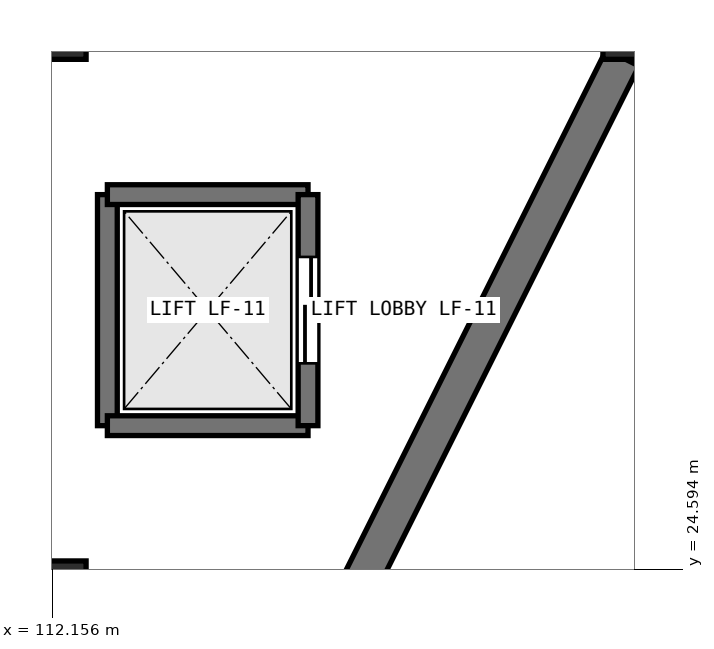
"""IFC4 building model, lengths in metres.
Left out: names, types, materials, properties, quantities, classifications, styles, units other than length and angle.
Written with IfcOpenShell. Run it as: python <this file> out.ifc"""

import sys

from ifc_helpers import new_model, si_unit, direction, frame, frame_2d, origin, origin_2d, place, context, subcontext, project, spatial, rectangle, extrude, element, fill, save


model = new_model("IFC4")
c1 = context("Model", 3, precision=1e-05, world=origin(), true_north=direction((0.0, 1.0)))
c2 = subcontext(c1, "Body", "Model", "MODEL_VIEW")
j1 = project(units=[si_unit("LENGTHUNIT", "METRE"), si_unit("PLANEANGLEUNIT", "RADIAN")], contexts=[c1])
p1 = place(None, origin())
s1 = spatial("IfcSite", under=j1, at=p1, CompositionType="ELEMENT")
p2 = place(p1, origin())
s2 = spatial("IfcBuilding", under=s1, at=p2, CompositionType="ELEMENT")
p3 = place(p2, frame((0.0, 0.0, -4.8)))
s3 = spatial("IfcBuildingStorey", under=s2, at=p3, CompositionType="ELEMENT", Elevation=-4.8)
for number, where, z_axis, x_axis in (
    (1, (112.0, 24.0, 0.0), (0.0, 0.0, 1.0), (1.0, 0.0, 0.0)),
    (2, (112.0, 32.0, 0.0), (0.0, 0.0, 1.0), (1.0, 0.0, 0.0)),
    (3, (120.0, 32.0, 0.0), (0.0, 0.0, 1.0), (1.0, 0.0, 0.0)),
):
    element("IfcColumn", number, at=place(p3, frame(where, z_axis=z_axis, x_axis=x_axis)), inside=s3, PredefinedType="COLUMN", context=c2, shape_type="SweptSolid", body=[
        extrude(rectangle(XDim=1.2, YDim=1.4, at=origin_2d()), origin(), (0.0, 0.0, 1.0), 4.8),
    ])
p4 = place(p3, frame((119.66, 31.32, 0.0), z_axis=(0.0, 0.0, 1.0), x_axis=(-0.447201662923, -0.894433157189, 0.0)))
e4 = element("IfcWall", 4, at=p4, inside=s3, PredefinedType="USERDEFINED", context=c2, shape_type="SweptSolid", body=[
    extrude(rectangle(XDim=8.184, YDim=0.48, at=frame_2d((4.092, 0.0))), origin(), (0.0, 0.0, 1.0), 4.46),
])
p5 = place(p3, frame((112.88, 26.48, 0.0), z_axis=(0.0, 0.0, 1.0), x_axis=(0.0, 1.0, 0.0)))
e5 = element("IfcWall", 5, at=p5, inside=s3, PredefinedType="SHEAR", context=c2, shape_type="SweptSolid", body=[
    extrude(rectangle(XDim=3.04, YDim=0.26, at=frame_2d((1.52, 0.0))), origin(), (0.0, 0.0, 1.0), 4.46),
])
for number, where, z_axis, x_axis in (
    (6, (112.88, 29.52, 0.0), (0.0, 0.0, 1.0), (1.0, 0.0, 0.0)),
    (7, (115.52, 26.48, 0.0), (0.0, 0.0, 1.0), (-1.0, 0.0, 0.0)),
):
    element("IfcWall", number, at=place(p3, frame(where, z_axis=z_axis, x_axis=x_axis)), inside=s3, PredefinedType="SHEAR", context=c2, shape_type="SweptSolid", body=[
        extrude(rectangle(XDim=2.64, YDim=0.26, at=frame_2d((1.32, 0.0))), origin(), (0.0, 0.0, 1.0), 4.46),
    ])
p6 = place(p3, frame((115.52, 29.52, 0.0), z_axis=(0.0, 0.0, 1.0), x_axis=(0.0, -1.0, 0.0)))
e8 = element("IfcWall", 8, at=p6, inside=s3, PredefinedType="SHEAR", context=c2, shape_type="SweptSolid", body=[
    extrude(rectangle(XDim=3.04, YDim=0.26, at=frame_2d((1.52, 0.0))), origin(), (0.0, 0.0, 1.0), 4.46),
])
p7 = place(p6, frame((0.82, 0.0, 0.0)))
e9 = element("IfcOpeningElement", 9, at=p7, cuts=e8, PredefinedType="OPENING", context=c2, shape_type="SweptSolid", body=[
    extrude(rectangle(XDim=1.4, YDim=2.2, at=frame_2d((0.7, 1.1))), frame((0.0, 0.14, 0.0), z_axis=(0.0, -1.0, 0.0), x_axis=(1.0, 0.0, 0.0)), (0.0, 0.0, 1.0), 0.28),
])
p8 = place(p7, origin())
e10 = element("IfcDoor", 10, at=p8, inside=s3, OperationType="SLIDING_TO_LEFT", PredefinedType="DOOR", context=c2, shape_type="SweptSolid", body=[
    extrude(rectangle(XDim=1.4, YDim=2.2, at=frame_2d((0.7, 1.1))), frame((0.0, 0.025, 0.0), z_axis=(0.0, -1.0, 0.0), x_axis=(1.0, 0.0, 0.0)), (0.0, 0.0, 1.0), 0.05),
])
fill(e9, e10)
save(model, sys.argv[1])
